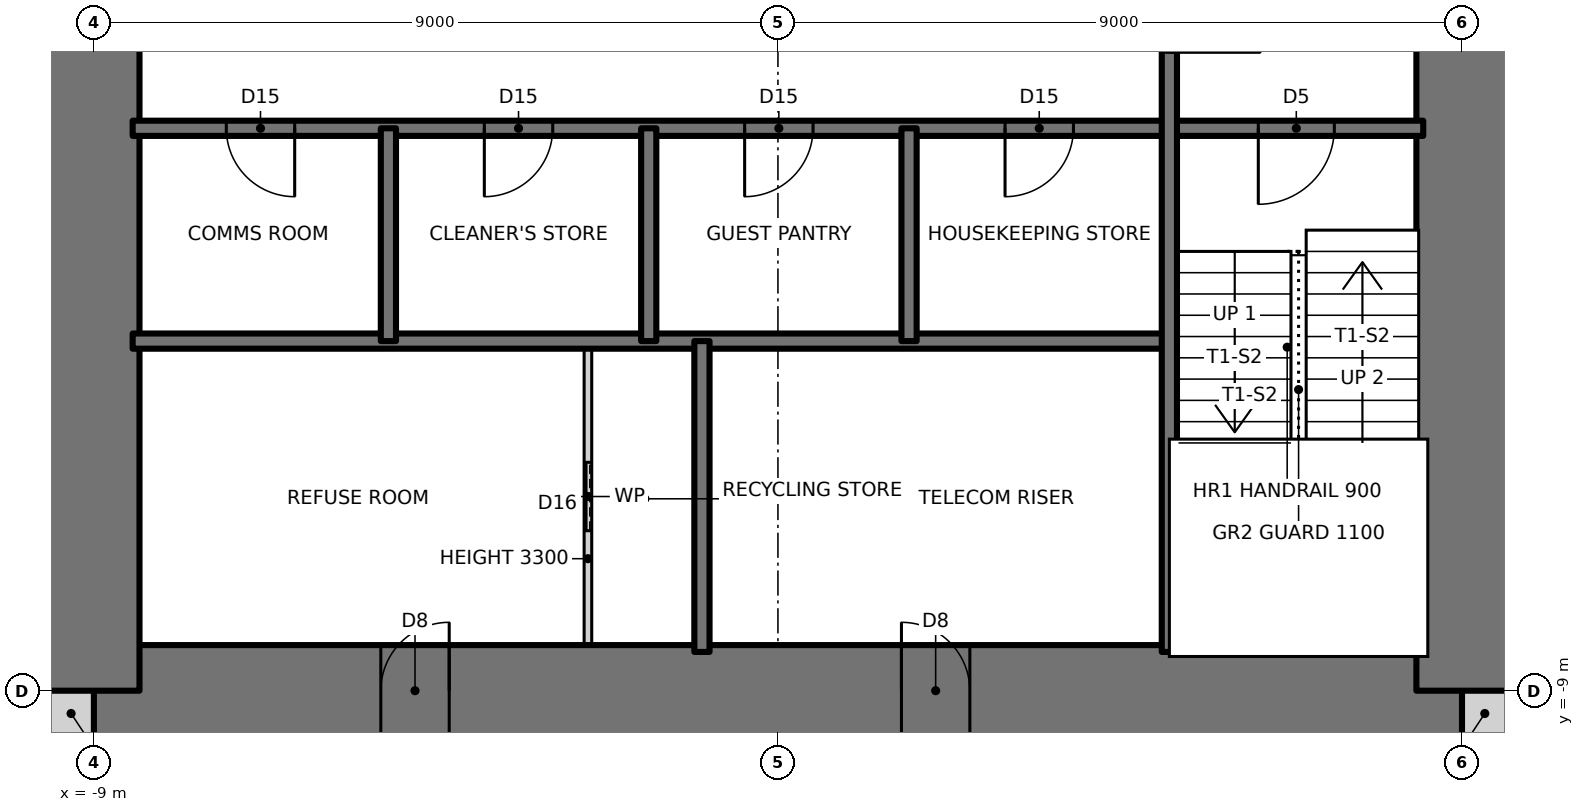
"""IFC4 building model, lengths in metres.
Left out: names, types, materials, properties, quantities, classifications, styles, units other than length and angle.
Written with IfcOpenShell. Run it as: python <this file> out.ifc"""

import sys

from ifc_helpers import new_model, si_unit, direction, frame, frame_2d, origin, place, context, subcontext, project, spatial, rectangle, extrude, element, fill, save


model = new_model("IFC4")
c1 = context("Model", 3, precision=1e-05, world=origin(), true_north=direction((0.0, 1.0)))
c2 = subcontext(c1, "Body", "Model", "MODEL_VIEW")
j1 = project(units=[si_unit("LENGTHUNIT", "METRE"), si_unit("PLANEANGLEUNIT", "RADIAN")], contexts=[c1])
p1 = place(None, origin())
s1 = spatial("IfcSite", under=j1, at=p1, CompositionType="ELEMENT")
p2 = place(p1, origin())
s2 = spatial("IfcBuilding", under=s1, at=p2, CompositionType="ELEMENT")
p3 = place(p2, frame((0.0, 0.0, 198.5)))
s3 = spatial("IfcBuildingStorey", under=s2, at=p3, CompositionType="ELEMENT", Elevation=198.5)
for number, where, z_axis, x_axis in (
    (1, (-9.6, -9.3, 0.0), (0.0, 0.0, 1.0), (1.0, 0.0, 0.0)),
    (2, (9.0, -9.3, 0.0), (0.0, 0.0, 1.0), (1.0, 0.0, 0.0)),
):
    element("IfcWall", number, at=place(p3, frame(where, z_axis=z_axis, x_axis=x_axis)), inside=s3, PredefinedType="SOLIDWALL", context=c2, shape_type="SweptSolid", body=[
        extrude(rectangle(XDim=0.6, YDim=0.6, at=frame_2d((0.3, 0.0))), origin(), (0.0, 0.0, 1.0), 3.5),
    ])
p4 = place(p3, frame((-9.0, -9.0, 0.0), z_axis=(0.0, 0.0, 1.0), x_axis=(1.0, 0.0, 0.0)))
e3 = element("IfcWall", 3, at=p4, inside=s3, PredefinedType="SHEAR", context=c2, shape_type="SweptSolid", body=[
    extrude(rectangle(XDim=18.0, YDim=1.2, at=frame_2d((9.0, 0.0))), origin(), (0.0, 0.0, 1.0), 3.5),
])
p5 = place(p4, frame((3.775, 0.0, 0.0)))
e4 = element("IfcOpeningElement", 4, at=p5, cuts=e3, PredefinedType="OPENING", context=c2, shape_type="SweptSolid", body=[
    extrude(rectangle(XDim=0.9, YDim=2.1, at=frame_2d((0.45, 1.05))), frame((0.0, 0.61, 0.0), z_axis=(0.0, -1.0, 0.0), x_axis=(1.0, 0.0, 0.0)), (0.0, 0.0, 1.0), 1.22),
])
p6 = place(p4, frame((10.625, 0.0, 0.0)))
e5 = element("IfcOpeningElement", 5, at=p6, cuts=e3, PredefinedType="OPENING", context=c2, shape_type="SweptSolid", body=[
    extrude(rectangle(XDim=0.9, YDim=2.1, at=frame_2d((0.45, 1.05))), frame((0.0, 0.61, 0.0), z_axis=(0.0, -1.0, 0.0), x_axis=(1.0, 0.0, 0.0)), (0.0, 0.0, 1.0), 1.22),
])
p7 = place(p3, frame((9.0, -9.0, 0.0), z_axis=(0.0, 0.0, 1.0), x_axis=(0.0, 1.0, 0.0)))
e6 = element("IfcWall", 6, at=p7, inside=s3, PredefinedType="SHEAR", context=c2, shape_type="SweptSolid", body=[
    extrude(rectangle(XDim=18.0, YDim=1.2, at=frame_2d((9.0, 0.0))), origin(), (0.0, 0.0, 1.0), 3.5),
])
p8 = place(p7, frame((8.5, 0.0, 0.0)))
e7 = element("IfcOpeningElement", 7, at=p8, cuts=e6, PredefinedType="OPENING", context=c2, shape_type="SweptSolid", body=[
    extrude(rectangle(XDim=1.0, YDim=2.1, at=frame_2d((0.5, 1.05))), frame((0.0, 0.61, 0.0), z_axis=(0.0, -1.0, 0.0), x_axis=(1.0, 0.0, 0.0)), (0.0, 0.0, 1.0), 1.22),
])
p9 = place(p3, frame((-9.0, 9.0, 0.0), z_axis=(0.0, 0.0, 1.0), x_axis=(0.0, -1.0, 0.0)))
e8 = element("IfcWall", 8, at=p9, inside=s3, PredefinedType="SHEAR", context=c2, shape_type="SweptSolid", body=[
    extrude(rectangle(XDim=18.0, YDim=1.2, at=frame_2d((9.0, 0.0))), origin(), (0.0, 0.0, 1.0), 3.5),
])
p10 = place(p9, frame((8.5, 0.0, 0.0)))
e9 = element("IfcOpeningElement", 9, at=p10, cuts=e8, PredefinedType="OPENING", context=c2, shape_type="SweptSolid", body=[
    extrude(rectangle(XDim=1.0, YDim=2.1, at=frame_2d((0.5, 1.05))), frame((0.0, 0.61, 0.0), z_axis=(0.0, -1.0, 0.0), x_axis=(1.0, 0.0, 0.0)), (0.0, 0.0, 1.0), 1.22),
])
p11 = place(p3, frame((-8.49, -4.4, 0.0), z_axis=(0.0, 0.0, 1.0), x_axis=(1.0, 0.0, 0.0)))
e10 = element("IfcWall", 10, at=p11, inside=s3, PredefinedType="SOLIDWALL", context=c2, shape_type="SweptSolid", body=[
    extrude(rectangle(XDim=13.64, YDim=0.2, at=frame_2d((6.82, 0.0))), origin(), (0.0, 0.0, 1.0), 3.5),
])
p12 = place(p3, frame((-8.49, -1.6, 0.0), z_axis=(0.0, 0.0, 1.0), x_axis=(1.0, 0.0, 0.0)))
e11 = element("IfcWall", 11, at=p12, inside=s3, PredefinedType="SOLIDWALL", context=c2, shape_type="SweptSolid", body=[
    extrude(rectangle(XDim=16.98, YDim=0.2, at=frame_2d((8.49, 0.0))), origin(), (0.0, 0.0, 1.0), 3.5),
])
p13 = place(p12, frame((14.81, 0.0, 0.0)))
e12 = element("IfcOpeningElement", 12, at=p13, cuts=e11, PredefinedType="OPENING", context=c2, shape_type="SweptSolid", body=[
    extrude(rectangle(XDim=1.0, YDim=2.1, at=frame_2d((0.5, 1.05))), frame((0.0, 0.11, 0.0), z_axis=(0.0, -1.0, 0.0), x_axis=(1.0, 0.0, 0.0)), (0.0, 0.0, 1.0), 0.22),
])
p14 = place(p12, frame((1.232, 0.0, 0.0)))
e13 = element("IfcOpeningElement", 13, at=p14, cuts=e11, PredefinedType="OPENING", context=c2, shape_type="SweptSolid", body=[
    extrude(rectangle(XDim=0.9, YDim=2.1, at=frame_2d((0.45, 1.05))), frame((0.0, 0.11, 0.0), z_axis=(0.0, -1.0, 0.0), x_axis=(1.0, 0.0, 0.0)), (0.0, 0.0, 1.0), 0.22),
])
p15 = place(p12, frame((4.627, 0.0, 0.0)))
e14 = element("IfcOpeningElement", 14, at=p15, cuts=e11, PredefinedType="OPENING", context=c2, shape_type="SweptSolid", body=[
    extrude(rectangle(XDim=0.9, YDim=2.1, at=frame_2d((0.45, 1.05))), frame((0.0, 0.11, 0.0), z_axis=(0.0, -1.0, 0.0), x_axis=(1.0, 0.0, 0.0)), (0.0, 0.0, 1.0), 0.22),
])
p16 = place(p12, frame((8.052, 0.0, 0.0)))
e15 = element("IfcOpeningElement", 15, at=p16, cuts=e11, PredefinedType="OPENING", context=c2, shape_type="SweptSolid", body=[
    extrude(rectangle(XDim=0.9, YDim=2.1, at=frame_2d((0.45, 1.05))), frame((0.0, 0.11, 0.0), z_axis=(0.0, -1.0, 0.0), x_axis=(1.0, 0.0, 0.0)), (0.0, 0.0, 1.0), 0.22),
])
p17 = place(p12, frame((11.478, 0.0, 0.0)))
e16 = element("IfcOpeningElement", 16, at=p17, cuts=e11, PredefinedType="OPENING", context=c2, shape_type="SweptSolid", body=[
    extrude(rectangle(XDim=0.9, YDim=2.1, at=frame_2d((0.45, 1.05))), frame((0.0, 0.11, 0.0), z_axis=(0.0, -1.0, 0.0), x_axis=(1.0, 0.0, 0.0)), (0.0, 0.0, 1.0), 0.22),
])
p18 = place(p3, frame((5.15, -8.49, 0.0), z_axis=(0.0, 0.0, 1.0), x_axis=(0.0, 1.0, 0.0)))
e17 = element("IfcWall", 17, at=p18, inside=s3, PredefinedType="SOLIDWALL", context=c2, shape_type="SweptSolid", body=[
    extrude(rectangle(XDim=13.09, YDim=0.2, at=frame_2d((6.545, 0.0))), origin(), (0.0, 0.0, 1.0), 3.5),
])
p19 = place(p18, frame((7.89, 0.0, 0.0)))
e18 = element("IfcOpeningElement", 18, at=p19, cuts=e17, PredefinedType="OPENING", context=c2, shape_type="SweptSolid", body=[
    extrude(rectangle(XDim=1.2, YDim=2.1, at=frame_2d((0.6, 1.05))), frame((0.0, 0.11, 0.0), z_axis=(0.0, -1.0, 0.0), x_axis=(1.0, 0.0, 0.0)), (0.0, 0.0, 1.0), 0.22),
])
p20 = place(p3, frame((1.725, -4.4, 0.0), z_axis=(0.0, 0.0, 1.0), x_axis=(0.0, 1.0, 0.0)))
e19 = element("IfcWall", 19, at=p20, inside=s3, PredefinedType="SOLIDWALL", context=c2, shape_type="SweptSolid", body=[
    extrude(rectangle(XDim=2.8, YDim=0.2, at=frame_2d((1.4, 0.0))), origin(), (0.0, 0.0, 1.0), 3.5),
])
p21 = place(p3, frame((-1.0, -8.49, 0.0), z_axis=(0.0, 0.0, 1.0), x_axis=(0.0, 1.0, 0.0)))
e20 = element("IfcWall", 20, at=p21, inside=s3, PredefinedType="SOLIDWALL", context=c2, shape_type="SweptSolid", body=[
    extrude(rectangle(XDim=4.09, YDim=0.2, at=frame_2d((2.045, 0.0))), origin(), (0.0, 0.0, 1.0), 3.5),
])
p22 = place(p3, frame((-1.7, -4.4, 0.0), z_axis=(0.0, 0.0, 1.0), x_axis=(0.0, 1.0, 0.0)))
e21 = element("IfcWall", 21, at=p22, inside=s3, PredefinedType="SOLIDWALL", context=c2, shape_type="SweptSolid", body=[
    extrude(rectangle(XDim=2.8, YDim=0.2, at=frame_2d((1.4, 0.0))), origin(), (0.0, 0.0, 1.0), 3.5),
])
p23 = place(p3, frame((-2.5, -8.49, 0.0), z_axis=(0.0, 0.0, 1.0), x_axis=(0.0, 1.0, 0.0)))
e22 = element("IfcWall", 22, at=p23, inside=s3, PredefinedType="PARTITIONING", context=c2, shape_type="SweptSolid", body=[
    extrude(rectangle(XDim=4.09, YDim=0.1, at=frame_2d((2.045, 0.0))), origin(), (0.0, 0.0, 1.0), 3.3),
])
p24 = place(p23, frame((1.595, 0.0, 0.0)))
e23 = element("IfcOpeningElement", 23, at=p24, cuts=e22, PredefinedType="OPENING", context=c2, shape_type="SweptSolid", body=[
    extrude(rectangle(XDim=0.9, YDim=2.1, at=frame_2d((0.45, 1.05))), frame((0.0, 0.06, 0.0), z_axis=(0.0, -1.0, 0.0), x_axis=(1.0, 0.0, 0.0)), (0.0, 0.0, 1.0), 0.12),
])
p25 = place(p3, frame((-5.125, -4.4, 0.0), z_axis=(0.0, 0.0, 1.0), x_axis=(0.0, 1.0, 0.0)))
e24 = element("IfcWall", 24, at=p25, inside=s3, PredefinedType="SOLIDWALL", context=c2, shape_type="SweptSolid", body=[
    extrude(rectangle(XDim=2.8, YDim=0.2, at=frame_2d((1.4, 0.0))), origin(), (0.0, 0.0, 1.0), 3.5),
])
p26 = place(p13, frame((1.0, 0.0, 0.0), z_axis=(0.0, 0.0, 1.0), x_axis=(-1.0, 0.0, 0.0)))
e25 = element("IfcDoor", 25, at=p26, inside=s3, OperationType="SINGLE_SWING_RIGHT", PredefinedType="DOOR", context=c2, shape_type="SweptSolid", body=[
    extrude(rectangle(XDim=1.0, YDim=2.1, at=frame_2d((0.5, 1.05))), frame((0.0, 0.025, 0.0), z_axis=(0.0, -1.0, 0.0), x_axis=(1.0, 0.0, 0.0)), (0.0, 0.0, 1.0), 0.05),
])
fill(e12, e25)
p27 = place(p19, frame((1.2, 0.0, 0.0), z_axis=(0.0, 0.0, 1.0), x_axis=(-1.0, 0.0, 0.0)))
e26 = element("IfcDoor", 26, at=p27, inside=s3, OperationType="SINGLE_SWING_RIGHT", PredefinedType="DOOR", context=c2, shape_type="SweptSolid", body=[
    extrude(rectangle(XDim=1.2, YDim=2.1, at=frame_2d((0.6, 1.05))), frame((0.0, 0.025, 0.0), z_axis=(0.0, -1.0, 0.0), x_axis=(1.0, 0.0, 0.0)), (0.0, 0.0, 1.0), 0.05),
])
fill(e18, e26)
p28 = place(p14, frame((0.9, 0.0, 0.0), z_axis=(0.0, 0.0, 1.0), x_axis=(-1.0, 0.0, 0.0)))
e27 = element("IfcDoor", 27, at=p28, inside=s3, OperationType="SINGLE_SWING_LEFT", PredefinedType="DOOR", context=c2, shape_type="SweptSolid", body=[
    extrude(rectangle(XDim=0.9, YDim=2.1, at=frame_2d((0.45, 1.05))), frame((0.0, 0.025, 0.0), z_axis=(0.0, -1.0, 0.0), x_axis=(1.0, 0.0, 0.0)), (0.0, 0.0, 1.0), 0.05),
])
fill(e13, e27)
p29 = place(p15, frame((0.9, 0.0, 0.0), z_axis=(0.0, 0.0, 1.0), x_axis=(-1.0, 0.0, 0.0)))
e28 = element("IfcDoor", 28, at=p29, inside=s3, OperationType="SINGLE_SWING_RIGHT", PredefinedType="DOOR", context=c2, shape_type="SweptSolid", body=[
    extrude(rectangle(XDim=0.9, YDim=2.1, at=frame_2d((0.45, 1.05))), frame((0.0, 0.025, 0.0), z_axis=(0.0, -1.0, 0.0), x_axis=(1.0, 0.0, 0.0)), (0.0, 0.0, 1.0), 0.05),
])
fill(e14, e28)
p30 = place(p16, frame((0.9, 0.0, 0.0), z_axis=(0.0, 0.0, 1.0), x_axis=(-1.0, 0.0, 0.0)))
e29 = element("IfcDoor", 29, at=p30, inside=s3, OperationType="SINGLE_SWING_RIGHT", PredefinedType="DOOR", context=c2, shape_type="SweptSolid", body=[
    extrude(rectangle(XDim=0.9, YDim=2.1, at=frame_2d((0.45, 1.05))), frame((0.0, 0.025, 0.0), z_axis=(0.0, -1.0, 0.0), x_axis=(1.0, 0.0, 0.0)), (0.0, 0.0, 1.0), 0.05),
])
fill(e15, e29)
p31 = place(p17, frame((0.9, 0.0, 0.0), z_axis=(0.0, 0.0, 1.0), x_axis=(-1.0, 0.0, 0.0)))
e30 = element("IfcDoor", 30, at=p31, inside=s3, OperationType="SINGLE_SWING_RIGHT", PredefinedType="DOOR", context=c2, shape_type="SweptSolid", body=[
    extrude(rectangle(XDim=0.9, YDim=2.1, at=frame_2d((0.45, 1.05))), frame((0.0, 0.025, 0.0), z_axis=(0.0, -1.0, 0.0), x_axis=(1.0, 0.0, 0.0)), (0.0, 0.0, 1.0), 0.05),
])
fill(e16, e30)
p32 = place(p24, origin())
e31 = element("IfcDoor", 31, at=p32, inside=s3, OperationType="SLIDING_TO_LEFT", PredefinedType="DOOR", context=c2, shape_type="SweptSolid", body=[
    extrude(rectangle(XDim=0.9, YDim=2.1, at=frame_2d((0.45, 1.05))), frame((0.0, 0.025, 0.0), z_axis=(0.0, -1.0, 0.0), x_axis=(1.0, 0.0, 0.0)), (0.0, 0.0, 1.0), 0.05),
])
fill(e23, e31)
p33 = place(p5, origin())
e32 = element("IfcDoor", 32, at=p33, inside=s3, OperationType="SINGLE_SWING_RIGHT", PredefinedType="DOOR", context=c2, shape_type="SweptSolid", body=[
    extrude(rectangle(XDim=0.9, YDim=2.1, at=frame_2d((0.45, 1.05))), frame((0.0, 0.025, 0.0), z_axis=(0.0, -1.0, 0.0), x_axis=(1.0, 0.0, 0.0)), (0.0, 0.0, 1.0), 0.05),
])
fill(e4, e32)
p34 = place(p6, origin())
e33 = element("IfcDoor", 33, at=p34, inside=s3, OperationType="SINGLE_SWING_LEFT", PredefinedType="DOOR", context=c2, shape_type="SweptSolid", body=[
    extrude(rectangle(XDim=0.9, YDim=2.1, at=frame_2d((0.45, 1.05))), frame((0.0, 0.025, 0.0), z_axis=(0.0, -1.0, 0.0), x_axis=(1.0, 0.0, 0.0)), (0.0, 0.0, 1.0), 0.05),
])
fill(e5, e33)
save(model, sys.argv[1])
